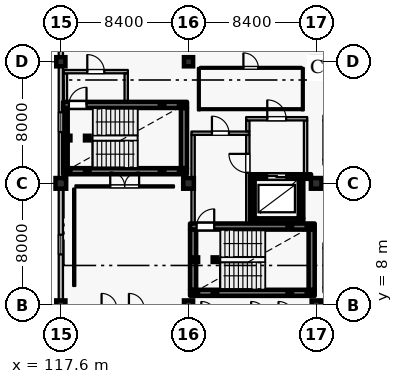
"""IFC4 building model, lengths in metres.
Left out: names, types, materials, properties, quantities, classifications, styles, units other than length and angle.
Written with IfcOpenShell. Run it as: python <this file> out.ifc"""

import sys

from ifc_helpers import new_model, si_unit, direction, frame, frame_2d, origin, origin_2d, place, context, subcontext, project, spatial, rectangle, hollow_rectangle, extrude, element, fill, save


model = new_model("IFC4")
c1 = context("Model", 3, precision=1e-05, world=origin(), true_north=direction((0.0, 1.0)))
c2 = subcontext(c1, "Body", "Model", "MODEL_VIEW")
j1 = project(units=[si_unit("LENGTHUNIT", "METRE"), si_unit("PLANEANGLEUNIT", "RADIAN")], contexts=[c1])
p1 = place(None, origin())
s1 = spatial("IfcSite", under=j1, at=p1, CompositionType="ELEMENT")
p2 = place(p1, origin())
s2 = spatial("IfcBuilding", under=s1, at=p2, CompositionType="ELEMENT")
p3 = place(p2, frame((0.0, 0.0, 36.0)))
s3 = spatial("IfcBuildingStorey", under=s2, at=p3, CompositionType="ELEMENT", Elevation=36.0)
for number, where, z_axis, x_axis in (
    (1, (117.6, 16.0, 0.0), (0.0, 0.0, 1.0), (1.0, 0.0, 0.0)),
    (2, (126.0, 16.0, 0.0), (0.0, 0.0, 1.0), (1.0, 0.0, 0.0)),
    (3, (134.4, 16.0, 0.0), (0.0, 0.0, 1.0), (1.0, 0.0, 0.0)),
):
    element("IfcColumn", number, at=place(p3, frame(where, z_axis=z_axis, x_axis=x_axis)), inside=s3, PredefinedType="COLUMN", context=c2, shape_type="SweptSolid", body=[
        extrude(rectangle(XDim=0.7, YDim=0.7, at=origin_2d()), origin(), (0.0, 0.0, 1.0), 3.6),
    ])
for number, where, z_axis, x_axis in (
    (4, (117.6, 8.0, 0.0), (0.0, 0.0, 1.0), (1.0, 0.0, 0.0)),
    (5, (117.6, 24.0, 0.0), (0.0, 0.0, 1.0), (1.0, 0.0, 0.0)),
    (6, (126.0, 8.0, 0.0), (0.0, 0.0, 1.0), (1.0, 0.0, 0.0)),
    (7, (126.0, 24.0, 0.0), (0.0, 0.0, 1.0), (1.0, 0.0, 0.0)),
    (8, (134.4, 8.0, 0.0), (0.0, 0.0, 1.0), (1.0, 0.0, 0.0)),
    (9, (134.4, 24.0, 0.0), (0.0, 0.0, 1.0), (1.0, 0.0, 0.0)),
):
    element("IfcColumn", number, at=place(p3, frame(where, z_axis=z_axis, x_axis=x_axis)), inside=s3, PredefinedType="COLUMN", context=c2, shape_type="SweptSolid", body=[
        extrude(rectangle(XDim=0.6, YDim=0.6, at=origin_2d()), origin(), (0.0, 0.0, 1.0), 3.6),
    ])
p4 = place(p3, frame((117.6, 8.3, 0.0), z_axis=(0.0, 0.0, 1.0), x_axis=(0.0, 1.0, 0.0)))
e10 = element("IfcWall", 10, at=p4, inside=s3, PredefinedType="SOLIDWALL", context=c2, shape_type="SweptSolid", body=[
    extrude(rectangle(XDim=7.35, YDim=0.28, at=frame_2d((3.675, 0.0))), origin(), (0.0, 0.0, 1.0), 2.7),
])
p5 = place(p4, frame((3.025, 0.0, 0.5)))
e11 = element("IfcOpeningElement", 11, at=p5, cuts=e10, PredefinedType="OPENING", context=c2, shape_type="SweptSolid", body=[
    extrude(rectangle(XDim=1.3, YDim=1.65, at=frame_2d((0.65, 0.825))), frame((0.0, 0.15, 0.0), z_axis=(0.0, -1.0, 0.0), x_axis=(1.0, 0.0, 0.0)), (0.0, 0.0, 1.0), 0.3),
])
p6 = place(p3, frame((117.6, 16.35, 0.0), z_axis=(0.0, 0.0, 1.0), x_axis=(0.0, 1.0, 0.0)))
e12 = element("IfcWall", 12, at=p6, inside=s3, PredefinedType="SOLIDWALL", context=c2, shape_type="SweptSolid", body=[
    extrude(rectangle(XDim=7.35, YDim=0.28, at=frame_2d((3.675, 0.0))), origin(), (0.0, 0.0, 1.0), 2.7),
])
p7 = place(p6, frame((3.025, 0.0, 0.5)))
e13 = element("IfcOpeningElement", 13, at=p7, cuts=e12, PredefinedType="OPENING", context=c2, shape_type="SweptSolid", body=[
    extrude(rectangle(XDim=1.3, YDim=1.65, at=frame_2d((0.65, 0.825))), frame((0.0, 0.15, 0.0), z_axis=(0.0, -1.0, 0.0), x_axis=(1.0, 0.0, 0.0)), (0.0, 0.0, 1.0), 0.3),
])
p8 = place(p3, frame((117.6, 24.3, 0.0), z_axis=(0.0, 0.0, 1.0), x_axis=(0.0, 1.0, 0.0)))
e14 = element("IfcWall", 14, at=p8, inside=s3, PredefinedType="SOLIDWALL", context=c2, shape_type="SweptSolid", body=[
    extrude(rectangle(XDim=7.35, YDim=0.28, at=frame_2d((3.675, 0.0))), origin(), (0.0, 0.0, 1.0), 2.7),
])
p9 = place(p8, frame((3.025, 0.0, 0.5)))
e15 = element("IfcOpeningElement", 15, at=p9, cuts=e14, PredefinedType="OPENING", context=c2, shape_type="SweptSolid", body=[
    extrude(rectangle(XDim=1.3, YDim=1.65, at=frame_2d((0.65, 0.825))), frame((0.0, 0.15, 0.0), z_axis=(0.0, -1.0, 0.0), x_axis=(1.0, 0.0, 0.0)), (0.0, 0.0, 1.0), 0.3),
])
p10 = place(p3, frame((130.05, 13.55, 0.0), z_axis=(0.0, 0.0, 1.0), x_axis=(1.0, 0.0, 0.0)))
e16 = element("IfcWall", 16, at=p10, inside=s3, PredefinedType="SHEAR", context=c2, shape_type="SweptSolid", body=[
    extrude(rectangle(XDim=3.5, YDim=0.3, at=frame_2d((1.75, 0.0))), origin(), (0.0, 0.0, 1.0), 3.365),
])
p11 = place(p3, frame((133.4, 13.705, 0.0), z_axis=(0.0, 0.0, 1.0), x_axis=(0.0, 1.0, 0.0)))
e17 = element("IfcWall", 17, at=p11, inside=s3, PredefinedType="SHEAR", context=c2, shape_type="SweptSolid", body=[
    extrude(rectangle(XDim=2.59, YDim=0.3, at=frame_2d((1.295, 0.0))), origin(), (0.0, 0.0, 1.0), 3.365),
])
p12 = place(p3, frame((134.06, 16.45, 0.0), z_axis=(0.0, 0.0, 1.0), x_axis=(-1.0, 0.0, 0.0)))
e18 = element("IfcWall", 18, at=p12, inside=s3, PredefinedType="SHEAR", context=c2, shape_type="SweptSolid", body=[
    extrude(rectangle(XDim=4.01, YDim=0.3, at=frame_2d((2.005, 0.0))), origin(), (0.0, 0.0, 1.0), 3.365),
])
p13 = place(p12, frame((1.635, 0.0, 0.0)))
e19 = element("IfcOpeningElement", 19, at=p13, cuts=e18, PredefinedType="OPENING", context=c2, shape_type="SweptSolid", body=[
    extrude(rectangle(XDim=1.25, YDim=2.25, at=frame_2d((0.625, 1.125))), frame((0.0, 0.16, 0.0), z_axis=(0.0, -1.0, 0.0), x_axis=(1.0, 0.0, 0.0)), (0.0, 0.0, 1.0), 0.32),
])
p14 = place(p3, frame((130.2, 16.295, 0.0), z_axis=(0.0, 0.0, 1.0), x_axis=(0.0, -1.0, 0.0)))
e20 = element("IfcWall", 20, at=p14, inside=s3, PredefinedType="SHEAR", context=c2, shape_type="SweptSolid", body=[
    extrude(rectangle(XDim=2.59, YDim=0.3, at=frame_2d((1.295, 0.0))), origin(), (0.0, 0.0, 1.0), 3.365),
])
p15 = place(p3, frame((126.1, 8.8, 0.0), z_axis=(0.0, 0.0, 1.0), x_axis=(1.0, 0.0, 0.0)))
e21 = element("IfcWall", 21, at=p15, inside=s3, PredefinedType="SHEAR", context=c2, shape_type="SweptSolid", body=[
    extrude(rectangle(XDim=8.2, YDim=0.4, at=frame_2d((4.1, 0.0))), origin(), (0.0, 0.0, 1.0), 3.365),
])
p16 = place(p3, frame((134.1, 9.005, 0.0), z_axis=(0.0, 0.0, 1.0), x_axis=(0.0, 1.0, 0.0)))
e22 = element("IfcWall", 22, at=p16, inside=s3, PredefinedType="SHEAR", context=c2, shape_type="SweptSolid", body=[
    extrude(rectangle(XDim=3.95, YDim=0.4, at=frame_2d((1.975, 0.0))), origin(), (0.0, 0.0, 1.0), 3.365),
])
p17 = place(p3, frame((126.1, 13.16, 0.0), z_axis=(0.0, 0.0, 1.0), x_axis=(1.0, 0.0, 0.0)))
e23 = element("IfcWall", 23, at=p17, inside=s3, PredefinedType="SHEAR", context=c2, shape_type="SweptSolid", body=[
    extrude(rectangle(XDim=8.2, YDim=0.4, at=frame_2d((4.1, 0.0))), origin(), (0.0, 0.0, 1.0), 3.365),
])
p18 = place(p17, frame((0.43, 0.0, 0.0)))
e24 = element("IfcOpeningElement", 24, at=p18, cuts=e23, PredefinedType="OPENING", context=c2, shape_type="SweptSolid", body=[
    extrude(rectangle(XDim=1.16, YDim=2.2, at=frame_2d((0.58, 1.1))), frame((0.0, 0.21, 0.0), z_axis=(0.0, -1.0, 0.0), x_axis=(1.0, 0.0, 0.0)), (0.0, 0.0, 1.0), 0.42),
])
p19 = place(p3, frame((126.3, 9.005, 0.0), z_axis=(0.0, 0.0, 1.0), x_axis=(0.0, 1.0, 0.0)))
e25 = element("IfcWall", 25, at=p19, inside=s3, PredefinedType="SHEAR", context=c2, shape_type="SweptSolid", body=[
    extrude(rectangle(XDim=3.95, YDim=0.4, at=frame_2d((1.975, 0.0))), origin(), (0.0, 0.0, 1.0), 3.365),
])
p20 = place(p3, frame((126.3, 13.365, 0.0), z_axis=(0.0, 0.0, 1.0), x_axis=(0.0, 1.0, 0.0)))
e26 = element("IfcWall", 26, at=p20, inside=s3, PredefinedType="PARTITIONING", context=c2, shape_type="SweptSolid", body=[
    extrude(rectangle(XDim=5.82, YDim=0.22, at=frame_2d((2.91, 0.0))), origin(), (0.0, 0.0, 1.0), 3.365),
])
p21 = place(p3, frame((126.19, 19.3, 0.0), z_axis=(0.0, 0.0, 1.0), x_axis=(1.0, 0.0, 0.0)))
e27 = element("IfcWall", 27, at=p21, inside=s3, PredefinedType="PARTITIONING", context=c2, shape_type="SweptSolid", body=[
    extrude(rectangle(XDim=3.82, YDim=0.22, at=frame_2d((1.91, 0.0))), origin(), (0.0, 0.0, 1.0), 3.365),
])
p22 = place(p21, frame((1.35, 0.0, 0.0)))
e28 = element("IfcOpeningElement", 28, at=p22, cuts=e27, PredefinedType="OPENING", context=c2, shape_type="SweptSolid", body=[
    extrude(rectangle(XDim=1.12, YDim=2.2, at=frame_2d((0.56, 1.1))), frame((0.0, 0.12, 0.0), z_axis=(0.0, -1.0, 0.0), x_axis=(1.0, 0.0, 0.0)), (0.0, 0.0, 1.0), 0.24),
])
p23 = place(p3, frame((129.9, 13.365, 0.0), z_axis=(0.0, 0.0, 1.0), x_axis=(0.0, 1.0, 0.0)))
e29 = element("IfcWall", 29, at=p23, inside=s3, PredefinedType="PARTITIONING", context=c2, shape_type="SweptSolid", body=[
    extrude(rectangle(XDim=5.82, YDim=0.22, at=frame_2d((2.91, 0.0))), origin(), (0.0, 0.0, 1.0), 3.365),
])
p24 = place(p23, frame((3.335, 0.0, 0.0)))
e30 = element("IfcOpeningElement", 30, at=p24, cuts=e29, PredefinedType="OPENING", context=c2, shape_type="SweptSolid", body=[
    extrude(rectangle(XDim=1.24, YDim=2.2, at=frame_2d((0.62, 1.1))), frame((0.0, 0.12, 0.0), z_axis=(0.0, -1.0, 0.0), x_axis=(1.0, 0.0, 0.0)), (0.0, 0.0, 1.0), 0.24),
])
p25 = place(p3, frame((129.9, 19.415, 0.0), z_axis=(0.0, 0.0, 1.0), x_axis=(0.0, 1.0, 0.0)))
e31 = element("IfcWall", 31, at=p25, inside=s3, PredefinedType="PARTITIONING", context=c2, shape_type="SweptSolid", body=[
    extrude(rectangle(XDim=0.72, YDim=0.22, at=frame_2d((0.36, 0.0))), origin(), (0.0, 0.0, 1.0), 3.365),
])
p26 = place(p3, frame((133.7, 16.605, 0.0), z_axis=(0.0, 0.0, 1.0), x_axis=(0.0, 1.0, 0.0)))
e32 = element("IfcWall", 32, at=p26, inside=s3, PredefinedType="PARTITIONING", context=c2, shape_type="SweptSolid", body=[
    extrude(rectangle(XDim=3.53, YDim=0.22, at=frame_2d((1.765, 0.0))), origin(), (0.0, 0.0, 1.0), 3.365),
])
p27 = place(p3, frame((129.79, 20.25, 0.0), z_axis=(0.0, 0.0, 1.0), x_axis=(1.0, 0.0, 0.0)))
e33 = element("IfcWall", 33, at=p27, inside=s3, PredefinedType="PARTITIONING", context=c2, shape_type="SweptSolid", body=[
    extrude(rectangle(XDim=4.02, YDim=0.22, at=frame_2d((2.01, 0.0))), origin(), (0.0, 0.0, 1.0), 3.365),
])
p28 = place(p27, frame((1.39, 0.0, 0.0)))
e34 = element("IfcOpeningElement", 34, at=p28, cuts=e33, PredefinedType="OPENING", context=c2, shape_type="SweptSolid", body=[
    extrude(rectangle(XDim=1.24, YDim=2.2, at=frame_2d((0.62, 1.1))), frame((0.0, 0.12, 0.0), z_axis=(0.0, -1.0, 0.0), x_axis=(1.0, 0.0, 0.0)), (0.0, 0.0, 1.0), 0.24),
])
for number, where, z_axis, x_axis in (
    (35, (126.48, 8.8, 0.0), (0.0, 0.0, 1.0), (1.0, 0.0, 0.0)),
    (36, (126.48, 10.98, 0.0), (0.0, 0.0, 1.0), (1.0, 0.0, 0.0)),
    (37, (127.74, 8.8, 0.0), (0.0, 0.0, 1.0), (1.0, 0.0, 0.0)),
    (38, (127.74, 10.98, 0.0), (0.0, 0.0, 1.0), (1.0, 0.0, 0.0)),
):
    element("IfcColumn", number, at=place(p3, frame(where, z_axis=z_axis, x_axis=x_axis)), inside=s3, PredefinedType="COLUMN", context=c2, shape_type="SweptSolid", body=[
        extrude(hollow_rectangle(XDim=0.3, YDim=0.3, WallThickness=0.012, at=origin_2d()), origin(), (0.0, 0.0, 1.0), 3.42),
    ])
for number, where, z_axis, x_axis in (
    (39, (132.66, 8.8, -1.8), (0.0, 0.0, 1.0), (1.0, 0.0, 0.0)),
    (40, (132.66, 13.16, -1.8), (0.0, 0.0, 1.0), (1.0, 0.0, 0.0)),
    (41, (133.92, 8.8, -1.8), (0.0, 0.0, 1.0), (1.0, 0.0, 0.0)),
    (42, (133.92, 13.16, -1.8), (0.0, 0.0, 1.0), (1.0, 0.0, 0.0)),
):
    element("IfcColumn", number, at=place(p3, frame(where, z_axis=z_axis, x_axis=x_axis)), inside=s3, PredefinedType="COLUMN", context=c2, shape_type="SweptSolid", body=[
        extrude(hollow_rectangle(XDim=0.3, YDim=0.3, WallThickness=0.012, at=origin_2d()), origin(), (0.0, 0.0, 1.0), 3.42),
    ])
p29 = place(p3, frame((117.75, 16.8, 0.0), z_axis=(0.0, 0.0, 1.0), x_axis=(1.0, 0.0, 0.0)))
e43 = element("IfcWall", 43, at=p29, inside=s3, PredefinedType="SHEAR", context=c2, shape_type="SweptSolid", body=[
    extrude(rectangle(XDim=8.15, YDim=0.4, at=frame_2d((4.075, 0.0))), origin(), (0.0, 0.0, 1.0), 3.365),
])
p30 = place(p3, frame((125.7, 17.005, 0.0), z_axis=(0.0, 0.0, 1.0), x_axis=(0.0, 1.0, 0.0)))
e44 = element("IfcWall", 44, at=p30, inside=s3, PredefinedType="SHEAR", context=c2, shape_type="SweptSolid", body=[
    extrude(rectangle(XDim=3.95, YDim=0.4, at=frame_2d((1.975, 0.0))), origin(), (0.0, 0.0, 1.0), 3.365),
])
p31 = place(p3, frame((117.75, 21.16, 0.0), z_axis=(0.0, 0.0, 1.0), x_axis=(1.0, 0.0, 0.0)))
e45 = element("IfcWall", 45, at=p31, inside=s3, PredefinedType="SHEAR", context=c2, shape_type="SweptSolid", body=[
    extrude(rectangle(XDim=8.15, YDim=0.4, at=frame_2d((4.075, 0.0))), origin(), (0.0, 0.0, 1.0), 3.365),
])
p32 = place(p31, frame((0.38, 0.0, 0.0)))
e46 = element("IfcOpeningElement", 46, at=p32, cuts=e45, PredefinedType="OPENING", context=c2, shape_type="SweptSolid", body=[
    extrude(rectangle(XDim=1.16, YDim=2.2, at=frame_2d((0.58, 1.1))), frame((0.0, 0.21, 0.0), z_axis=(0.0, -1.0, 0.0), x_axis=(1.0, 0.0, 0.0)), (0.0, 0.0, 1.0), 0.42),
])
p33 = place(p3, frame((117.9, 17.005, 0.0), z_axis=(0.0, 0.0, 1.0), x_axis=(0.0, 1.0, 0.0)))
e47 = element("IfcWall", 47, at=p33, inside=s3, PredefinedType="SHEAR", context=c2, shape_type="SweptSolid", body=[
    extrude(rectangle(XDim=3.95, YDim=0.3, at=frame_2d((1.975, 0.0))), origin(), (0.0, 0.0, 1.0), 3.365),
])
p34 = place(p3, frame((117.9, 21.365, 0.0), z_axis=(0.0, 0.0, 1.0), x_axis=(0.0, 1.0, 0.0)))
e48 = element("IfcWall", 48, at=p34, inside=s3, PredefinedType="PARTITIONING", context=c2, shape_type="SweptSolid", body=[
    extrude(rectangle(XDim=1.87, YDim=0.22, at=frame_2d((0.935, 0.0))), origin(), (0.0, 0.0, 1.0), 3.365),
])
p35 = place(p3, frame((117.79, 23.35, 0.0), z_axis=(0.0, 0.0, 1.0), x_axis=(1.0, 0.0, 0.0)))
e49 = element("IfcWall", 49, at=p35, inside=s3, PredefinedType="PARTITIONING", context=c2, shape_type="SweptSolid", body=[
    extrude(rectangle(XDim=4.22, YDim=0.22, at=frame_2d((2.11, 0.0))), origin(), (0.0, 0.0, 1.0), 3.365),
])
p36 = place(p35, frame((1.55, 0.0, 0.0)))
e50 = element("IfcOpeningElement", 50, at=p36, cuts=e49, PredefinedType="OPENING", context=c2, shape_type="SweptSolid", body=[
    extrude(rectangle(XDim=1.12, YDim=2.2, at=frame_2d((0.56, 1.1))), frame((0.0, 0.12, 0.0), z_axis=(0.0, -1.0, 0.0), x_axis=(1.0, 0.0, 0.0)), (0.0, 0.0, 1.0), 0.24),
])
p37 = place(p3, frame((121.9, 21.365, 0.0), z_axis=(0.0, 0.0, 1.0), x_axis=(0.0, 1.0, 0.0)))
e51 = element("IfcWall", 51, at=p37, inside=s3, PredefinedType="PARTITIONING", context=c2, shape_type="SweptSolid", body=[
    extrude(rectangle(XDim=1.87, YDim=0.22, at=frame_2d((0.935, 0.0))), origin(), (0.0, 0.0, 1.0), 3.365),
])
for number, where, z_axis, x_axis in (
    (52, (118.08, 16.8, 0.0), (0.0, 0.0, 1.0), (1.0, 0.0, 0.0)),
    (53, (118.08, 18.98, 0.0), (0.0, 0.0, 1.0), (1.0, 0.0, 0.0)),
    (54, (119.34, 16.8, 0.0), (0.0, 0.0, 1.0), (1.0, 0.0, 0.0)),
    (55, (119.34, 18.98, 0.0), (0.0, 0.0, 1.0), (1.0, 0.0, 0.0)),
):
    element("IfcColumn", number, at=place(p3, frame(where, z_axis=z_axis, x_axis=x_axis)), inside=s3, PredefinedType="COLUMN", context=c2, shape_type="SweptSolid", body=[
        extrude(hollow_rectangle(XDim=0.3, YDim=0.3, WallThickness=0.012, at=origin_2d()), origin(), (0.0, 0.0, 1.0), 3.42),
    ])
for number, where, z_axis, x_axis in (
    (56, (124.26, 16.8, -1.8), (0.0, 0.0, 1.0), (1.0, 0.0, 0.0)),
    (57, (124.26, 21.16, -1.8), (0.0, 0.0, 1.0), (1.0, 0.0, 0.0)),
    (58, (125.52, 16.8, -1.8), (0.0, 0.0, 1.0), (1.0, 0.0, 0.0)),
    (59, (125.52, 21.16, -1.8), (0.0, 0.0, 1.0), (1.0, 0.0, 0.0)),
):
    element("IfcColumn", number, at=place(p3, frame(where, z_axis=z_axis, x_axis=x_axis)), inside=s3, PredefinedType="COLUMN", context=c2, shape_type="SweptSolid", body=[
        extrude(hollow_rectangle(XDim=0.3, YDim=0.3, WallThickness=0.012, at=origin_2d()), origin(), (0.0, 0.0, 1.0), 3.42),
    ])
p38 = place(p3, frame((118.56, 15.8, 0.0), z_axis=(0.0, 0.0, 1.0), x_axis=(1.0, 0.0, 0.0)))
e60 = element("IfcWall", 60, at=p38, inside=s3, PredefinedType="PARTITIONING", context=c2, shape_type="SweptSolid", body=[
    extrude(rectangle(XDim=6.48, YDim=0.14, at=frame_2d((3.24, 0.0))), origin(), (0.0, 0.0, 1.0), 3.365),
])
p39 = place(p38, frame((2.29, 0.0, 0.0)))
e61 = element("IfcOpeningElement", 61, at=p39, cuts=e60, PredefinedType="OPENING", context=c2, shape_type="SweptSolid", body=[
    extrude(rectangle(XDim=1.9, YDim=2.4, at=frame_2d((0.95, 1.2))), frame((0.0, 0.08, 0.0), z_axis=(0.0, -1.0, 0.0), x_axis=(1.0, 0.0, 0.0)), (0.0, 0.0, 1.0), 0.16),
])
p40 = place(p3, frame((118.48, 9.25, 0.0), z_axis=(0.0, 0.0, 1.0), x_axis=(0.0, 1.0, 0.0)))
e62 = element("IfcWall", 62, at=p40, inside=s3, PredefinedType="PARTITIONING", context=c2, shape_type="SweptSolid", body=[
    extrude(rectangle(XDim=6.41, YDim=0.14, at=frame_2d((3.205, 0.0))), origin(), (0.0, 0.0, 1.0), 3.365),
])
p41 = place(p3, frame((126.76, 23.6, 0.0), z_axis=(0.0, 0.0, 1.0), x_axis=(1.0, 0.0, 0.0)))
e63 = element("IfcWall", 63, at=p41, inside=s3, PredefinedType="PARTITIONING", context=c2, shape_type="SweptSolid", body=[
    extrude(rectangle(XDim=6.68, YDim=0.125, at=frame_2d((3.34, 0.0))), origin(), (0.0, 0.0, 1.0), 3.365),
])
p42 = place(p41, frame((2.85, 0.0, 0.0)))
e64 = element("IfcOpeningElement", 64, at=p42, cuts=e63, PredefinedType="OPENING", context=c2, shape_type="SweptSolid", body=[
    extrude(rectangle(XDim=0.98, YDim=2.15, at=frame_2d((0.49, 1.075))), frame((0.0, 0.073, 0.0), z_axis=(0.0, -1.0, 0.0), x_axis=(1.0, 0.0, 0.0)), (0.0, 0.0, 1.0), 0.145),
])
for number, where, z_axis, x_axis in (
    (65, (126.68, 20.8, 0.0), (0.0, 0.0, 1.0), (0.0, 1.0, 0.0)),
    (66, (133.52, 20.8, 0.0), (0.0, 0.0, 1.0), (0.0, 1.0, 0.0)),
):
    element("IfcWall", number, at=place(p3, frame(where, z_axis=z_axis, x_axis=x_axis)), inside=s3, PredefinedType="PARTITIONING", context=c2, shape_type="SweptSolid", body=[
        extrude(rectangle(XDim=2.796, YDim=0.125, at=frame_2d((1.398, 0.0))), origin(), (0.0, 0.0, 1.0), 3.365),
    ])
p43 = place(p3, frame((126.742, 20.88, 0.0), z_axis=(0.0, 0.0, 1.0), x_axis=(1.0, 0.0, 0.0)))
e67 = element("IfcWall", 67, at=p43, inside=s3, PredefinedType="PARTITIONING", context=c2, shape_type="SweptSolid", body=[
    extrude(rectangle(XDim=6.715, YDim=0.125, at=frame_2d((3.357, 0.0))), origin(), (0.0, 0.0, 1.0), 3.365),
])
p44 = place(p5, origin())
e68 = element("IfcWindow", 68, at=p44, inside=s3, PartitioningType="SINGLE_PANEL", PredefinedType="WINDOW", context=c2, shape_type="SweptSolid", body=[
    extrude(rectangle(XDim=1.3, YDim=1.65, at=frame_2d((0.65, 0.825))), frame((0.0, 0.03, 0.0), z_axis=(0.0, -1.0, 0.0), x_axis=(1.0, 0.0, 0.0)), (0.0, 0.0, 1.0), 0.06),
])
fill(e11, e68)
p45 = place(p7, origin())
e69 = element("IfcWindow", 69, at=p45, inside=s3, PartitioningType="SINGLE_PANEL", PredefinedType="WINDOW", context=c2, shape_type="SweptSolid", body=[
    extrude(rectangle(XDim=1.3, YDim=1.65, at=frame_2d((0.65, 0.825))), frame((0.0, 0.03, 0.0), z_axis=(0.0, -1.0, 0.0), x_axis=(1.0, 0.0, 0.0)), (0.0, 0.0, 1.0), 0.06),
])
fill(e13, e69)
p46 = place(p13, origin())
e70 = element("IfcDoor", 70, at=p46, inside=s3, OperationType="DOUBLE_DOOR_SLIDING", PredefinedType="DOOR", context=c2, shape_type="SweptSolid", body=[
    extrude(rectangle(XDim=1.25, YDim=2.25, at=frame_2d((0.625, 1.125))), frame((0.0, 0.025, 0.0), z_axis=(0.0, -1.0, 0.0), x_axis=(1.0, 0.0, 0.0)), (0.0, 0.0, 1.0), 0.05),
])
fill(e19, e70)
p47 = place(p18, origin())
e71 = element("IfcDoor", 71, at=p47, inside=s3, OperationType="SINGLE_SWING_RIGHT", PredefinedType="DOOR", context=c2, shape_type="SweptSolid", body=[
    extrude(rectangle(XDim=1.16, YDim=2.2, at=frame_2d((0.58, 1.1))), frame((0.0, 0.025, 0.0), z_axis=(0.0, -1.0, 0.0), x_axis=(1.0, 0.0, 0.0)), (0.0, 0.0, 1.0), 0.05),
])
fill(e24, e71)
p48 = place(p22, origin())
e72 = element("IfcDoor", 72, at=p48, inside=s3, OperationType="SINGLE_SWING_LEFT", PredefinedType="DOOR", context=c2, shape_type="SweptSolid", body=[
    extrude(rectangle(XDim=1.12, YDim=2.2, at=frame_2d((0.56, 1.1))), frame((0.0, 0.025, 0.0), z_axis=(0.0, -1.0, 0.0), x_axis=(1.0, 0.0, 0.0)), (0.0, 0.0, 1.0), 0.05),
])
fill(e28, e72)
p49 = place(p24, origin())
e73 = element("IfcDoor", 73, at=p49, inside=s3, OperationType="SINGLE_SWING_RIGHT", PredefinedType="DOOR", context=c2, shape_type="SweptSolid", body=[
    extrude(rectangle(XDim=1.24, YDim=2.2, at=frame_2d((0.62, 1.1))), frame((0.0, 0.025, 0.0), z_axis=(0.0, -1.0, 0.0), x_axis=(1.0, 0.0, 0.0)), (0.0, 0.0, 1.0), 0.05),
])
fill(e30, e73)
p50 = place(p28, origin())
e74 = element("IfcDoor", 74, at=p50, inside=s3, OperationType="SINGLE_SWING_LEFT", PredefinedType="DOOR", context=c2, shape_type="SweptSolid", body=[
    extrude(rectangle(XDim=1.24, YDim=2.2, at=frame_2d((0.62, 1.1))), frame((0.0, 0.025, 0.0), z_axis=(0.0, -1.0, 0.0), x_axis=(1.0, 0.0, 0.0)), (0.0, 0.0, 1.0), 0.05),
])
fill(e34, e74)
p51 = place(p32, origin())
e75 = element("IfcDoor", 75, at=p51, inside=s3, OperationType="SINGLE_SWING_RIGHT", PredefinedType="DOOR", context=c2, shape_type="SweptSolid", body=[
    extrude(rectangle(XDim=1.16, YDim=2.2, at=frame_2d((0.58, 1.1))), frame((0.0, 0.025, 0.0), z_axis=(0.0, -1.0, 0.0), x_axis=(1.0, 0.0, 0.0)), (0.0, 0.0, 1.0), 0.05),
])
fill(e46, e75)
p52 = place(p36, origin())
e76 = element("IfcDoor", 76, at=p52, inside=s3, OperationType="SINGLE_SWING_LEFT", PredefinedType="DOOR", context=c2, shape_type="SweptSolid", body=[
    extrude(rectangle(XDim=1.12, YDim=2.2, at=frame_2d((0.56, 1.1))), frame((0.0, 0.025, 0.0), z_axis=(0.0, -1.0, 0.0), x_axis=(1.0, 0.0, 0.0)), (0.0, 0.0, 1.0), 0.05),
])
fill(e50, e76)
p53 = place(p39, origin())
e77 = element("IfcDoor", 77, at=p53, inside=s3, OperationType="DOUBLE_DOOR_SINGLE_SWING", PredefinedType="DOOR", context=c2, shape_type="SweptSolid", body=[
    extrude(rectangle(XDim=1.9, YDim=2.4, at=frame_2d((0.95, 1.2))), frame((0.0, 0.025, 0.0), z_axis=(0.0, -1.0, 0.0), x_axis=(1.0, 0.0, 0.0)), (0.0, 0.0, 1.0), 0.05),
])
fill(e61, e77)
p54 = place(p42, origin())
e78 = element("IfcDoor", 78, at=p54, inside=s3, OperationType="SINGLE_SWING_LEFT", PredefinedType="DOOR", context=c2, shape_type="SweptSolid", body=[
    extrude(rectangle(XDim=0.98, YDim=2.15, at=frame_2d((0.49, 1.075))), frame((0.0, 0.025, 0.0), z_axis=(0.0, -1.0, 0.0), x_axis=(1.0, 0.0, 0.0)), (0.0, 0.0, 1.0), 0.05),
])
fill(e64, e78)
save(model, sys.argv[1])
